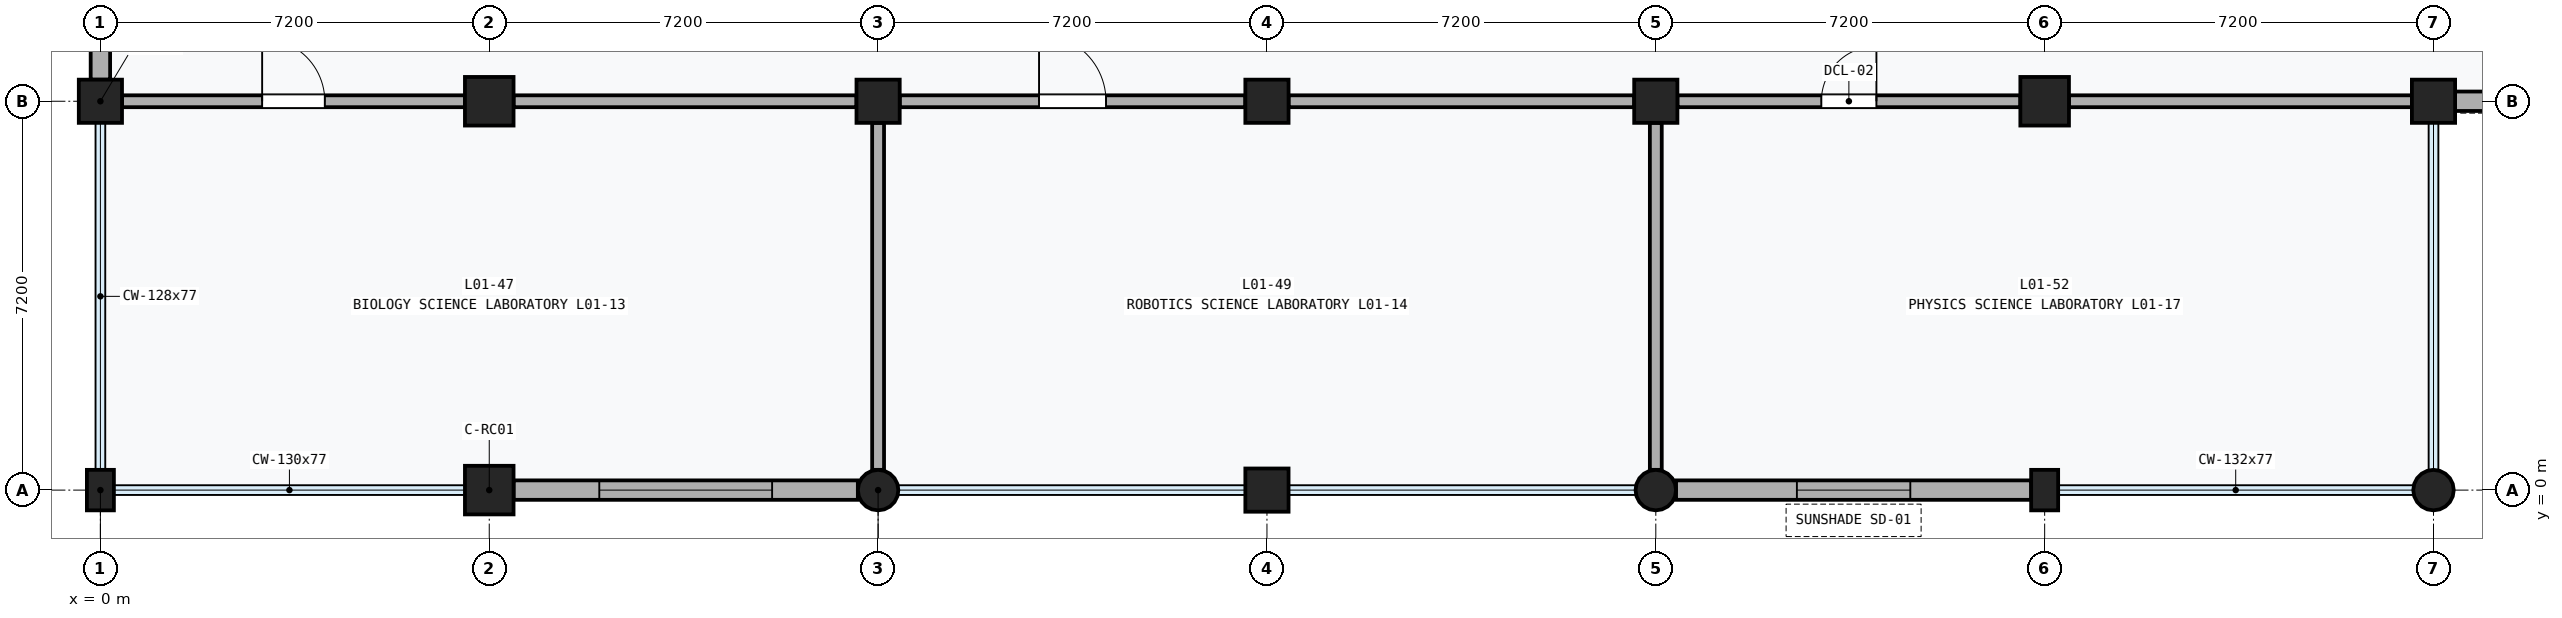
"""IFC4 building model, lengths in metres.
Left out: names, types, materials, properties, quantities, classifications, styles, units other than length and angle.
Written with IfcOpenShell. Run it as: python <this file> out.ifc"""

import sys

from ifc_helpers import new_model, si_unit, direction, frame, frame_2d, origin, origin_with_axes, origin_2d, place, context, subcontext, project, spatial, rectangle, circle, extrude, element, fill, save


model = new_model("IFC4")
c1 = context("Model", 3, precision=1e-05, world=origin(), true_north=direction((0.0, 1.0)))
c2 = subcontext(c1, "Body", "Model", "MODEL_VIEW")
j1 = project(units=[si_unit("LENGTHUNIT", "METRE"), si_unit("PLANEANGLEUNIT", "RADIAN")], contexts=[c1])
p1 = place(None, origin())
s1 = spatial("IfcSite", under=j1, at=p1, CompositionType="ELEMENT")
p2 = place(p1, origin())
s2 = spatial("IfcBuilding", under=s1, at=p2, CompositionType="ELEMENT")
p3 = place(p2, frame((0.0, 0.0, 4.8)))
s3 = spatial("IfcBuildingStorey", under=s2, at=p3, CompositionType="ELEMENT", Elevation=4.8)
p4 = place(p3, origin_with_axes())
e1 = element("IfcColumn", 1, at=p4, inside=s3, PredefinedType="PILASTER", context=c2, shape_type="SweptSolid", body=[
    extrude(rectangle(XDim=0.5, YDim=0.75, at=origin_2d()), origin(), (0.0, 0.0, 1.0), 4.8),
])
p5 = place(p3, frame((0.0, 7.2, 0.0), z_axis=(0.0, 0.0, 1.0), x_axis=(1.0, 0.0, 0.0)))
e2 = element("IfcColumn", 2, at=p5, inside=s3, PredefinedType="COLUMN", context=c2, shape_type="SweptSolid", body=[
    extrude(rectangle(XDim=0.8, YDim=0.8, at=origin_2d()), origin(), (0.0, 0.0, 1.0), 4.8),
])
for number, where, z_axis, x_axis in (
    (3, (7.2, 0.0, 0.0), (0.0, 0.0, 1.0), (1.0, 0.0, 0.0)),
    (4, (7.2, 7.2, 0.0), (0.0, 0.0, 1.0), (1.0, 0.0, 0.0)),
):
    element("IfcColumn", number, at=place(p3, frame(where, z_axis=z_axis, x_axis=x_axis)), inside=s3, PredefinedType="COLUMN", context=c2, shape_type="SweptSolid", body=[
        extrude(rectangle(XDim=0.9, YDim=0.9, at=origin_2d()), origin(), (0.0, 0.0, 1.0), 4.8),
    ])
p6 = place(p3, frame((14.4, 0.0, 0.0), z_axis=(0.0, 0.0, 1.0), x_axis=(1.0, 0.0, 0.0)))
e5 = element("IfcColumn", 5, at=p6, inside=s3, PredefinedType="COLUMN", context=c2, shape_type="SweptSolid", body=[
    extrude(circle(Radius=0.375, at=origin_2d()), origin(), (0.0, 0.0, 1.0), 4.8),
])
for number, where, z_axis, x_axis in (
    (6, (14.4, 7.2, 0.0), (0.0, 0.0, 1.0), (1.0, 0.0, 0.0)),
    (7, (21.6, 0.0, 0.0), (0.0, 0.0, 1.0), (1.0, 0.0, 0.0)),
    (8, (21.6, 7.2, 0.0), (0.0, 0.0, 1.0), (1.0, 0.0, 0.0)),
):
    element("IfcColumn", number, at=place(p3, frame(where, z_axis=z_axis, x_axis=x_axis)), inside=s3, PredefinedType="COLUMN", context=c2, shape_type="SweptSolid", body=[
        extrude(rectangle(XDim=0.8, YDim=0.8, at=origin_2d()), origin(), (0.0, 0.0, 1.0), 4.8),
    ])
p7 = place(p3, frame((28.8, 0.0, 0.0), z_axis=(0.0, 0.0, 1.0), x_axis=(1.0, 0.0, 0.0)))
e9 = element("IfcColumn", 9, at=p7, inside=s3, PredefinedType="COLUMN", context=c2, shape_type="SweptSolid", body=[
    extrude(circle(Radius=0.375, at=origin_2d()), origin(), (0.0, 0.0, 1.0), 4.8),
])
p8 = place(p3, frame((28.8, 7.2, 0.0), z_axis=(0.0, 0.0, 1.0), x_axis=(1.0, 0.0, 0.0)))
e10 = element("IfcColumn", 10, at=p8, inside=s3, PredefinedType="COLUMN", context=c2, shape_type="SweptSolid", body=[
    extrude(rectangle(XDim=0.8, YDim=0.8, at=origin_2d()), origin(), (0.0, 0.0, 1.0), 4.8),
])
p9 = place(p3, frame((36.0, 0.0, 0.0), z_axis=(0.0, 0.0, 1.0), x_axis=(1.0, 0.0, 0.0)))
e11 = element("IfcColumn", 11, at=p9, inside=s3, PredefinedType="PILASTER", context=c2, shape_type="SweptSolid", body=[
    extrude(rectangle(XDim=0.5, YDim=0.75, at=origin_2d()), origin(), (0.0, 0.0, 1.0), 4.8),
])
p10 = place(p3, frame((36.0, 7.2, 0.0), z_axis=(0.0, 0.0, 1.0), x_axis=(1.0, 0.0, 0.0)))
e12 = element("IfcColumn", 12, at=p10, inside=s3, PredefinedType="COLUMN", context=c2, shape_type="SweptSolid", body=[
    extrude(rectangle(XDim=0.9, YDim=0.9, at=origin_2d()), origin(), (0.0, 0.0, 1.0), 4.8),
])
p11 = place(p3, frame((43.2, 0.0, 0.0), z_axis=(0.0, 0.0, 1.0), x_axis=(1.0, 0.0, 0.0)))
e13 = element("IfcColumn", 13, at=p11, inside=s3, PredefinedType="COLUMN", context=c2, shape_type="SweptSolid", body=[
    extrude(circle(Radius=0.375, at=origin_2d()), origin(), (0.0, 0.0, 1.0), 4.8),
])
p12 = place(p3, frame((43.2, 7.2, 0.0), z_axis=(0.0, 0.0, 1.0), x_axis=(1.0, 0.0, 0.0)))
e14 = element("IfcColumn", 14, at=p12, inside=s3, PredefinedType="COLUMN", context=c2, shape_type="SweptSolid", body=[
    extrude(rectangle(XDim=0.8, YDim=0.8, at=origin_2d()), origin(), (0.0, 0.0, 1.0), 4.8),
])
p13 = place(p3, frame((0.0, 7.6, 0.0), z_axis=(0.0, 0.0, 1.0), x_axis=(0.0, 1.0, 0.0)))
e15 = element("IfcWall", 15, at=p13, inside=s3, PredefinedType="SOLIDWALL", context=c2, shape_type="SweptSolid", body=[
    extrude(rectangle(XDim=6.4, YDim=0.36, at=frame_2d((3.2, 0.0))), origin(), (0.0, 0.0, 1.0), 3.85),
])
p14 = place(p13, frame((1.6, 0.0, 0.9)))
e16 = element("IfcOpeningElement", 16, at=p14, cuts=e15, PredefinedType="OPENING", context=c2, shape_type="SweptSolid", body=[
    extrude(rectangle(XDim=3.2, YDim=1.8, at=frame_2d((1.6, 0.9))), frame((0.0, 0.192, 0.0), z_axis=(0.0, -1.0, 0.0), x_axis=(1.0, 0.0, 0.0)), (0.0, 0.0, 1.0), 0.384),
])
p15 = place(p3, frame((7.65, 0.0, 0.0), z_axis=(0.0, 0.0, 1.0), x_axis=(1.0, 0.0, 0.0)))
e17 = element("IfcWall", 17, at=p15, inside=s3, PredefinedType="SOLIDWALL", context=c2, shape_type="SweptSolid", body=[
    extrude(rectangle(XDim=6.375, YDim=0.36, at=frame_2d((3.188, 0.0))), origin(), (0.0, 0.0, 1.0), 3.85),
])
p16 = place(p15, frame((1.587, 0.0, 0.9)))
e18 = element("IfcOpeningElement", 18, at=p16, cuts=e17, PredefinedType="OPENING", context=c2, shape_type="SweptSolid", body=[
    extrude(rectangle(XDim=3.2, YDim=1.8, at=frame_2d((1.6, 0.9))), frame((0.0, 0.192, 0.0), z_axis=(0.0, -1.0, 0.0), x_axis=(1.0, 0.0, 0.0)), (0.0, 0.0, 1.0), 0.384),
])
p17 = place(p3, frame((29.175, 0.0, 0.0), z_axis=(0.0, 0.0, 1.0), x_axis=(1.0, 0.0, 0.0)))
e19 = element("IfcWall", 19, at=p17, inside=s3, PredefinedType="SOLIDWALL", context=c2, shape_type="SweptSolid", body=[
    extrude(rectangle(XDim=6.575, YDim=0.36, at=frame_2d((3.288, 0.0))), origin(), (0.0, 0.0, 1.0), 3.85),
])
p18 = place(p17, frame((2.238, 0.0, 0.85)))
e20 = element("IfcOpeningElement", 20, at=p18, cuts=e19, PredefinedType="OPENING", context=c2, shape_type="SweptSolid", body=[
    extrude(rectangle(XDim=2.1, YDim=2.0, at=frame_2d((1.05, 1.0))), frame((0.0, 0.192, 0.0), z_axis=(0.0, -1.0, 0.0), x_axis=(1.0, 0.0, 0.0)), (0.0, 0.0, 1.0), 0.384),
])
p19 = place(p3, frame((43.6, 7.2, 0.0), z_axis=(0.0, 0.0, 1.0), x_axis=(1.0, 0.0, 0.0)))
e21 = element("IfcWall", 21, at=p19, inside=s3, PredefinedType="SOLIDWALL", context=c2, shape_type="SweptSolid", body=[
    extrude(rectangle(XDim=6.4, YDim=0.36, at=frame_2d((3.2, 0.0))), origin(), (0.0, 0.0, 1.0), 3.85),
])
p20 = place(p19, frame((1.7, 0.0, 0.85)))
e22 = element("IfcOpeningElement", 22, at=p20, cuts=e21, PredefinedType="OPENING", context=c2, shape_type="SweptSolid", body=[
    extrude(rectangle(XDim=3.0, YDim=2.0, at=frame_2d((1.5, 1.0))), frame((0.0, 0.192, 0.0), z_axis=(0.0, -1.0, 0.0), x_axis=(1.0, 0.0, 0.0)), (0.0, 0.0, 1.0), 0.384),
])
p21 = place(p3, frame((0.4, 7.2, 0.0), z_axis=(0.0, 0.0, 1.0), x_axis=(1.0, 0.0, 0.0)))
e23 = element("IfcWall", 23, at=p21, inside=s3, PredefinedType="PARTITIONING", context=c2, shape_type="SweptSolid", body=[
    extrude(rectangle(XDim=6.35, YDim=0.22, at=frame_2d((3.175, 0.0))), origin(), (0.0, 0.0, 1.0), 3.58),
])
p22 = place(p21, frame((2.595, 0.0, 0.0)))
e24 = element("IfcOpeningElement", 24, at=p22, cuts=e23, PredefinedType="OPENING", context=c2, shape_type="SweptSolid", body=[
    extrude(rectangle(XDim=1.16, YDim=2.22, at=frame_2d((0.58, 1.11))), frame((0.0, 0.122, 0.0), z_axis=(0.0, -1.0, 0.0), x_axis=(1.0, 0.0, 0.0)), (0.0, 0.0, 1.0), 0.244),
])
p23 = place(p3, frame((7.65, 7.2, 0.0), z_axis=(0.0, 0.0, 1.0), x_axis=(1.0, 0.0, 0.0)))
e25 = element("IfcWall", 25, at=p23, inside=s3, PredefinedType="PARTITIONING", context=c2, shape_type="SweptSolid", body=[
    extrude(rectangle(XDim=6.35, YDim=0.22, at=frame_2d((3.175, 0.0))), origin(), (0.0, 0.0, 1.0), 3.58),
])
p24 = place(p3, frame((14.4, 0.375, 0.0), z_axis=(0.0, 0.0, 1.0), x_axis=(0.0, 1.0, 0.0)))
e26 = element("IfcWall", 26, at=p24, inside=s3, PredefinedType="PARTITIONING", context=c2, shape_type="SweptSolid", body=[
    extrude(rectangle(XDim=6.425, YDim=0.22, at=frame_2d((3.212, 0.0))), origin(), (0.0, 0.0, 1.0), 3.58),
])
p25 = place(p3, frame((14.8, 7.2, 0.0), z_axis=(0.0, 0.0, 1.0), x_axis=(1.0, 0.0, 0.0)))
e27 = element("IfcWall", 27, at=p25, inside=s3, PredefinedType="PARTITIONING", context=c2, shape_type="SweptSolid", body=[
    extrude(rectangle(XDim=6.4, YDim=0.22, at=frame_2d((3.2, 0.0))), origin(), (0.0, 0.0, 1.0), 3.58),
])
p26 = place(p25, frame((2.58, 0.0, 0.0)))
e28 = element("IfcOpeningElement", 28, at=p26, cuts=e27, PredefinedType="OPENING", context=c2, shape_type="SweptSolid", body=[
    extrude(rectangle(XDim=1.24, YDim=2.26, at=frame_2d((0.62, 1.13))), frame((0.0, 0.122, 0.0), z_axis=(0.0, -1.0, 0.0), x_axis=(1.0, 0.0, 0.0)), (0.0, 0.0, 1.0), 0.244),
])
p27 = place(p3, frame((22.0, 7.2, 0.0), z_axis=(0.0, 0.0, 1.0), x_axis=(1.0, 0.0, 0.0)))
e29 = element("IfcWall", 29, at=p27, inside=s3, PredefinedType="PARTITIONING", context=c2, shape_type="SweptSolid", body=[
    extrude(rectangle(XDim=6.4, YDim=0.22, at=frame_2d((3.2, 0.0))), origin(), (0.0, 0.0, 1.0), 3.58),
])
p28 = place(p3, frame((28.8, 0.375, 0.0), z_axis=(0.0, 0.0, 1.0), x_axis=(0.0, 1.0, 0.0)))
e30 = element("IfcWall", 30, at=p28, inside=s3, PredefinedType="PARTITIONING", context=c2, shape_type="SweptSolid", body=[
    extrude(rectangle(XDim=6.425, YDim=0.22, at=frame_2d((3.212, 0.0))), origin(), (0.0, 0.0, 1.0), 3.58),
])
p29 = place(p3, frame((29.2, 7.2, 0.0), z_axis=(0.0, 0.0, 1.0), x_axis=(1.0, 0.0, 0.0)))
e31 = element("IfcWall", 31, at=p29, inside=s3, PredefinedType="PARTITIONING", context=c2, shape_type="SweptSolid", body=[
    extrude(rectangle(XDim=6.35, YDim=0.22, at=frame_2d((3.175, 0.0))), origin(), (0.0, 0.0, 1.0), 3.58),
])
p30 = place(p29, frame((2.665, 0.0, 0.0)))
e32 = element("IfcOpeningElement", 32, at=p30, cuts=e31, PredefinedType="OPENING", context=c2, shape_type="SweptSolid", body=[
    extrude(rectangle(XDim=1.02, YDim=2.12, at=frame_2d((0.51, 1.06))), frame((0.0, 0.122, 0.0), z_axis=(0.0, -1.0, 0.0), x_axis=(1.0, 0.0, 0.0)), (0.0, 0.0, 1.0), 0.244),
])
p31 = place(p3, frame((36.45, 7.2, 0.0), z_axis=(0.0, 0.0, 1.0), x_axis=(1.0, 0.0, 0.0)))
e33 = element("IfcWall", 33, at=p31, inside=s3, PredefinedType="PARTITIONING", context=c2, shape_type="SweptSolid", body=[
    extrude(rectangle(XDim=6.35, YDim=0.22, at=frame_2d((3.175, 0.0))), origin(), (0.0, 0.0, 1.0), 3.58),
])
p32 = place(p16, origin())
e34 = element("IfcWindow", 34, at=p32, inside=s3, PartitioningType="SINGLE_PANEL", PredefinedType="WINDOW", context=c2, shape_type="SweptSolid", body=[
    extrude(rectangle(XDim=3.2, YDim=1.8, at=frame_2d((1.6, 0.9))), frame((0.0, 0.03, 0.0), z_axis=(0.0, -1.0, 0.0), x_axis=(1.0, 0.0, 0.0)), (0.0, 0.0, 1.0), 0.06),
])
fill(e18, e34)
p33 = place(p18, origin())
e35 = element("IfcWindow", 35, at=p33, inside=s3, PartitioningType="SINGLE_PANEL", PredefinedType="WINDOW", context=c2, shape_type="SweptSolid", body=[
    extrude(rectangle(XDim=2.1, YDim=2.0, at=frame_2d((1.05, 1.0))), frame((0.0, 0.03, 0.0), z_axis=(0.0, -1.0, 0.0), x_axis=(1.0, 0.0, 0.0)), (0.0, 0.0, 1.0), 0.06),
])
fill(e20, e35)
p34 = place(p22, origin())
e36 = element("IfcDoor", 36, at=p34, inside=s3, OperationType="SINGLE_SWING_LEFT", PredefinedType="DOOR", context=c2, shape_type="SweptSolid", body=[
    extrude(rectangle(XDim=1.16, YDim=2.22, at=frame_2d((0.58, 1.11))), frame((0.0, 0.025, 0.0), z_axis=(0.0, -1.0, 0.0), x_axis=(1.0, 0.0, 0.0)), (0.0, 0.0, 1.0), 0.05),
])
fill(e24, e36)
p35 = place(p26, origin())
e37 = element("IfcDoor", 37, at=p35, inside=s3, OperationType="SINGLE_SWING_LEFT", PredefinedType="DOOR", context=c2, shape_type="SweptSolid", body=[
    extrude(rectangle(XDim=1.24, YDim=2.26, at=frame_2d((0.62, 1.13))), frame((0.0, 0.025, 0.0), z_axis=(0.0, -1.0, 0.0), x_axis=(1.0, 0.0, 0.0)), (0.0, 0.0, 1.0), 0.05),
])
fill(e28, e37)
p36 = place(p30, origin())
e38 = element("IfcDoor", 38, at=p36, inside=s3, OperationType="SINGLE_SWING_RIGHT", PredefinedType="DOOR", context=c2, shape_type="SweptSolid", body=[
    extrude(rectangle(XDim=1.02, YDim=2.12, at=frame_2d((0.51, 1.06))), frame((0.0, 0.025, 0.0), z_axis=(0.0, -1.0, 0.0), x_axis=(1.0, 0.0, 0.0)), (0.0, 0.0, 1.0), 0.05),
])
fill(e32, e38)
save(model, sys.argv[1])
